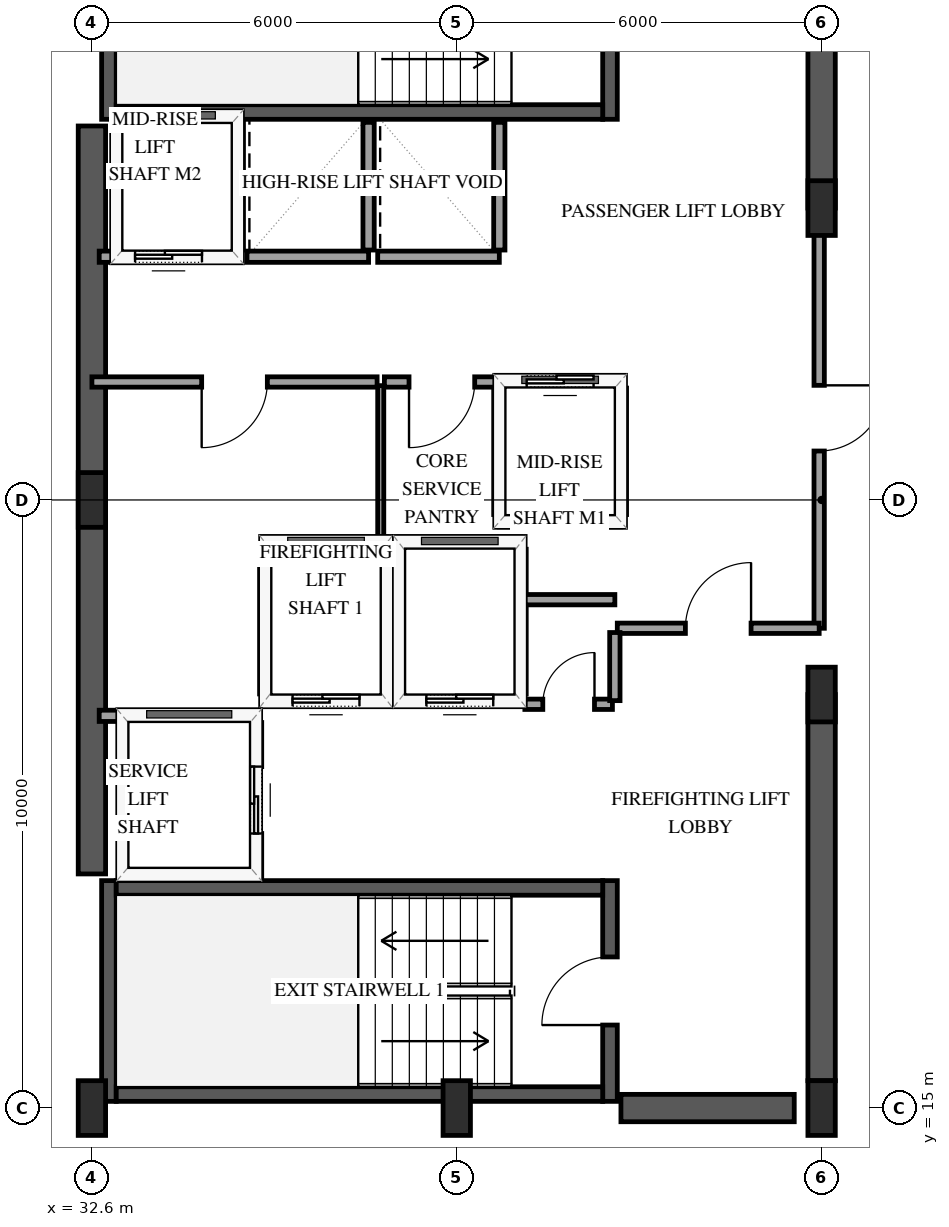
"""IFC4 building model, lengths in metres.
Left out: names, types, materials, properties, quantities, classifications, styles, units other than length and angle.
Written with IfcOpenShell. Run it as: python <this file> out.ifc"""

import sys

from ifc_helpers import new_model, si_unit, direction, frame, frame_2d, origin, origin_2d, place, context, subcontext, project, spatial, rectangle, extrude, element, fill, save


model = new_model("IFC4")
c1 = context("Model", 3, precision=1e-05, world=origin(), true_north=direction((0.0, 1.0)))
c2 = subcontext(c1, "Body", "Model", "MODEL_VIEW")
j1 = project(units=[si_unit("LENGTHUNIT", "METRE"), si_unit("PLANEANGLEUNIT", "RADIAN")], contexts=[c1])
p1 = place(None, origin())
s1 = spatial("IfcSite", under=j1, at=p1, CompositionType="ELEMENT")
p2 = place(p1, origin())
s2 = spatial("IfcBuilding", under=s1, at=p2, CompositionType="ELEMENT")
p3 = place(p2, frame((0.0, 0.0, 190.6)))
s3 = spatial("IfcBuildingStorey", under=s2, at=p3, CompositionType="ELEMENT", Elevation=190.6)
p4 = place(p3, frame((32.88, 15.11, 0.0), z_axis=(0.0, 0.0, 1.0), x_axis=(0.0, 1.0, 0.0)))
e1 = element("IfcWall", 1, at=p4, inside=s3, PredefinedType="SHEAR", context=c2, shape_type="SweptSolid", body=[
    extrude(rectangle(XDim=3.63, YDim=0.24, at=frame_2d((1.815, 0.0))), origin(), (0.0, 0.0, 1.0), 3.6),
])
p5 = place(p3, frame((41.12, 15.11, 0.0), z_axis=(0.0, 0.0, 1.0), x_axis=(0.0, 1.0, 0.0)))
e2 = element("IfcWall", 2, at=p5, inside=s3, PredefinedType="SHEAR", context=c2, shape_type="SweptSolid", body=[
    extrude(rectangle(XDim=3.63, YDim=0.24, at=frame_2d((1.815, 0.0))), origin(), (0.0, 0.0, 1.0), 3.6),
])
p6 = place(p5, frame((1.255, 0.0, 0.0)))
e3 = element("IfcOpeningElement", 3, at=p6, cuts=e2, PredefinedType="OPENING", context=c2, shape_type="SweptSolid", body=[
    extrude(rectangle(XDim=1.12, YDim=2.15, at=frame_2d((0.56, 1.075))), frame((0.0, 0.13, 0.0), z_axis=(0.0, -1.0, 0.0), x_axis=(1.0, 0.0, 0.0)), (0.0, 0.0, 1.0), 0.26),
])
for number, where, z_axis, x_axis in (
    (4, (33.0, 15.23, 0.0), (0.0, 0.0, 1.0), (1.0, 0.0, 0.0)),
    (5, (33.0, 18.62, 0.0), (0.0, 0.0, 1.0), (1.0, 0.0, 0.0)),
):
    element("IfcWall", number, at=place(p3, frame(where, z_axis=z_axis, x_axis=x_axis)), inside=s3, PredefinedType="SHEAR", context=c2, shape_type="SweptSolid", body=[
        extrude(rectangle(XDim=8.0, YDim=0.24, at=frame_2d((4.0, 0.0))), origin(), (0.0, 0.0, 1.0), 3.6),
    ])
p7 = place(p3, frame((32.88, 31.26, 0.0), z_axis=(0.0, 0.0, 1.0), x_axis=(0.0, 1.0, 0.0)))
e6 = element("IfcWall", 6, at=p7, inside=s3, PredefinedType="SHEAR", context=c2, shape_type="SweptSolid", body=[
    extrude(rectangle(XDim=3.63, YDim=0.24, at=frame_2d((1.815, 0.0))), origin(), (0.0, 0.0, 1.0), 3.6),
])
p8 = place(p3, frame((41.12, 31.26, 0.0), z_axis=(0.0, 0.0, 1.0), x_axis=(0.0, 1.0, 0.0)))
e7 = element("IfcWall", 7, at=p8, inside=s3, PredefinedType="SHEAR", context=c2, shape_type="SweptSolid", body=[
    extrude(rectangle(XDim=3.63, YDim=0.24, at=frame_2d((1.815, 0.0))), origin(), (0.0, 0.0, 1.0), 3.6),
])
p9 = place(p8, frame((1.255, 0.0, 0.0)))
e8 = element("IfcOpeningElement", 8, at=p9, cuts=e7, PredefinedType="OPENING", context=c2, shape_type="SweptSolid", body=[
    extrude(rectangle(XDim=1.12, YDim=2.15, at=frame_2d((0.56, 1.075))), frame((0.0, 0.13, 0.0), z_axis=(0.0, -1.0, 0.0), x_axis=(1.0, 0.0, 0.0)), (0.0, 0.0, 1.0), 0.26),
])
p10 = place(p3, frame((33.0, 31.38, 0.0), z_axis=(0.0, 0.0, 1.0), x_axis=(1.0, 0.0, 0.0)))
e9 = element("IfcWall", 9, at=p10, inside=s3, PredefinedType="SHEAR", context=c2, shape_type="SweptSolid", body=[
    extrude(rectangle(XDim=8.0, YDim=0.24, at=frame_2d((4.0, 0.0))), origin(), (0.0, 0.0, 1.0), 3.6),
])
p11 = place(p3, frame((32.6, 18.85, 0.0), z_axis=(0.0, 0.0, 1.0), x_axis=(0.0, 1.0, 0.0)))
e10 = element("IfcWall", 10, at=p11, inside=s3, PredefinedType="SHEAR", context=c2, shape_type="SweptSolid", body=[
    extrude(rectangle(XDim=12.3, YDim=0.45, at=frame_2d((6.15, 0.0))), origin(), (0.0, 0.0, 1.0), 3.6),
])
p12 = place(p3, frame((41.3, 15.0, 0.0), z_axis=(0.0, 0.0, 1.0), x_axis=(1.0, 0.0, 0.0)))
e11 = element("IfcWall", 11, at=p12, inside=s3, PredefinedType="SHEAR", context=c2, shape_type="SweptSolid", body=[
    extrude(rectangle(XDim=2.85, YDim=0.45, at=frame_2d((1.425, 0.0))), origin(), (0.0, 0.0, 1.0), 3.6),
])
p13 = place(p3, frame((44.6, 15.45, 0.0), z_axis=(0.0, 0.0, 1.0), x_axis=(0.0, 1.0, 0.0)))
e12 = element("IfcWall", 12, at=p13, inside=s3, PredefinedType="SHEAR", context=c2, shape_type="SweptSolid", body=[
    extrude(rectangle(XDim=6.35, YDim=0.45, at=frame_2d((3.175, 0.0))), origin(), (0.0, 0.0, 1.0), 3.6),
])
p14 = place(p3, frame((44.6, 29.8, 0.0), z_axis=(0.0, 0.0, 1.0), x_axis=(0.0, 1.0, 0.0)))
e13 = element("IfcWall", 13, at=p14, inside=s3, PredefinedType="SHEAR", context=c2, shape_type="SweptSolid", body=[
    extrude(rectangle(XDim=4.75, YDim=0.45, at=frame_2d((2.375, 0.0))), origin(), (0.0, 0.0, 1.0), 3.6),
])
for number, where, z_axis, x_axis in (
    (14, (32.6, 15.0, -0.3), (0.0, 0.0, 1.0), (1.0, 0.0, 0.0)),
    (15, (32.6, 25.0, -0.3), (0.0, 0.0, 1.0), (1.0, 0.0, 0.0)),
    (16, (38.6, 15.0, -0.3), (0.0, 0.0, 1.0), (1.0, 0.0, 0.0)),
    (17, (44.6, 15.0, -0.3), (0.0, 0.0, 1.0), (1.0, 0.0, 0.0)),
    (18, (44.6, 21.8, -0.3), (0.0, 0.0, 1.0), (1.0, 0.0, 0.0)),
    (19, (44.6, 29.8, -0.3), (0.0, 0.0, 1.0), (1.0, 0.0, 0.0)),
):
    element("IfcColumn", number, at=place(p3, frame(where, z_axis=z_axis, x_axis=x_axis)), inside=s3, PredefinedType="PILASTER", context=c2, shape_type="SweptSolid", body=[
        extrude(rectangle(XDim=0.45, YDim=0.9, at=origin_2d()), origin(), (0.0, 0.0, 1.0), 3.9),
    ])
p15 = place(p3, frame((35.45, 21.7, 0.0), z_axis=(0.0, 0.0, 1.0), x_axis=(1.0, 0.0, 0.0)))
e20 = element("IfcWall", 20, at=p15, inside=s3, PredefinedType="SOLIDWALL", context=c2, shape_type="SweptSolid", body=[
    extrude(rectangle(XDim=2.0, YDim=0.185, at=frame_2d((1.0, 0.0))), origin(), (0.0, 0.0, 1.0), 3.3),
])
p16 = place(p15, frame((0.45, 0.0, 0.0)))
e21 = element("IfcOpeningElement", 21, at=p16, cuts=e20, PredefinedType="OPENING", context=c2, shape_type="SweptSolid", body=[
    extrude(rectangle(XDim=1.1, YDim=2.15, at=frame_2d((0.55, 1.075))), frame((0.0, 0.103, 0.0), z_axis=(0.0, -1.0, 0.0), x_axis=(1.0, 0.0, 0.0)), (0.0, 0.0, 1.0), 0.205),
])
p17 = place(p3, frame((35.45, 24.3, 0.0), z_axis=(0.0, 0.0, 1.0), x_axis=(1.0, 0.0, 0.0)))
e22 = element("IfcWall", 22, at=p17, inside=s3, PredefinedType="SOLIDWALL", context=c2, shape_type="SweptSolid", body=[
    extrude(rectangle(XDim=2.0, YDim=0.185, at=frame_2d((1.0, 0.0))), origin(), (0.0, 0.0, 1.0), 3.3),
])
for number, where, z_axis, x_axis in (
    (23, (35.45, 21.81, 0.0), (0.0, 0.0, 1.0), (0.0, 1.0, 0.0)),
    (24, (37.45, 21.81, 0.0), (0.0, 0.0, 1.0), (0.0, 1.0, 0.0)),
):
    element("IfcWall", number, at=place(p3, frame(where, z_axis=z_axis, x_axis=x_axis)), inside=s3, PredefinedType="SOLIDWALL", context=c2, shape_type="SweptSolid", body=[
        extrude(rectangle(XDim=2.38, YDim=0.185, at=frame_2d((1.19, 0.0))), origin(), (0.0, 0.0, 1.0), 3.3),
    ])
p18 = place(p3, frame((37.65, 21.7, 0.0), z_axis=(0.0, 0.0, 1.0), x_axis=(1.0, 0.0, 0.0)))
e25 = element("IfcWall", 25, at=p18, inside=s3, PredefinedType="SOLIDWALL", context=c2, shape_type="SweptSolid", body=[
    extrude(rectangle(XDim=2.0, YDim=0.185, at=frame_2d((1.0, 0.0))), origin(), (0.0, 0.0, 1.0), 3.3),
])
p19 = place(p18, frame((0.45, 0.0, 0.0)))
e26 = element("IfcOpeningElement", 26, at=p19, cuts=e25, PredefinedType="OPENING", context=c2, shape_type="SweptSolid", body=[
    extrude(rectangle(XDim=1.1, YDim=2.15, at=frame_2d((0.55, 1.075))), frame((0.0, 0.103, 0.0), z_axis=(0.0, -1.0, 0.0), x_axis=(1.0, 0.0, 0.0)), (0.0, 0.0, 1.0), 0.205),
])
p20 = place(p3, frame((37.65, 24.3, 0.0), z_axis=(0.0, 0.0, 1.0), x_axis=(1.0, 0.0, 0.0)))
e27 = element("IfcWall", 27, at=p20, inside=s3, PredefinedType="SOLIDWALL", context=c2, shape_type="SweptSolid", body=[
    extrude(rectangle(XDim=2.0, YDim=0.185, at=frame_2d((1.0, 0.0))), origin(), (0.0, 0.0, 1.0), 3.3),
])
p21 = place(p3, frame((39.65, 21.81, 0.0), z_axis=(0.0, 0.0, 1.0), x_axis=(0.0, 1.0, 0.0)))
e28 = element("IfcWall", 28, at=p21, inside=s3, PredefinedType="SOLIDWALL", context=c2, shape_type="SweptSolid", body=[
    extrude(rectangle(XDim=2.38, YDim=0.185, at=frame_2d((1.19, 0.0))), origin(), (0.0, 0.0, 1.0), 3.3),
])
p22 = place(p3, frame((32.72, 21.45, 0.0), z_axis=(0.0, 0.0, 1.0), x_axis=(1.0, 0.0, 0.0)))
e29 = element("IfcWall", 29, at=p22, inside=s3, PredefinedType="SOLIDWALL", context=c2, shape_type="SweptSolid", body=[
    extrude(rectangle(XDim=2.58, YDim=0.185, at=frame_2d((1.29, 0.0))), origin(), (0.0, 0.0, 1.0), 3.3),
])
p23 = place(p3, frame((35.3, 18.79, 0.0), z_axis=(0.0, 0.0, 1.0), x_axis=(0.0, 1.0, 0.0)))
e30 = element("IfcWall", 30, at=p23, inside=s3, PredefinedType="SOLIDWALL", context=c2, shape_type="SweptSolid", body=[
    extrude(rectangle(XDim=2.55, YDim=0.185, at=frame_2d((1.275, 0.0))), origin(), (0.0, 0.0, 1.0), 3.3),
])
p24 = place(p23, frame((0.725, 0.0, 0.0)))
e31 = element("IfcOpeningElement", 31, at=p24, cuts=e30, PredefinedType="OPENING", context=c2, shape_type="SweptSolid", body=[
    extrude(rectangle(XDim=1.1, YDim=2.15, at=frame_2d((0.55, 1.075))), frame((0.0, 0.103, 0.0), z_axis=(0.0, -1.0, 0.0), x_axis=(1.0, 0.0, 0.0)), (0.0, 0.0, 1.0), 0.205),
])
p25 = place(p3, frame((39.3, 24.65, 0.0), z_axis=(0.0, 0.0, 1.0), x_axis=(1.0, 0.0, 0.0)))
e32 = element("IfcWall", 32, at=p25, inside=s3, PredefinedType="SOLIDWALL", context=c2, shape_type="SweptSolid", body=[
    extrude(rectangle(XDim=2.0, YDim=0.185, at=frame_2d((1.0, 0.0))), origin(), (0.0, 0.0, 1.0), 3.3),
])
p26 = place(p3, frame((39.3, 26.95, 0.0), z_axis=(0.0, 0.0, 1.0), x_axis=(1.0, 0.0, 0.0)))
e33 = element("IfcWall", 33, at=p26, inside=s3, PredefinedType="SOLIDWALL", context=c2, shape_type="SweptSolid", body=[
    extrude(rectangle(XDim=2.0, YDim=0.185, at=frame_2d((1.0, 0.0))), origin(), (0.0, 0.0, 1.0), 3.3),
])
p27 = place(p26, frame((0.45, 0.0, 0.0)))
e34 = element("IfcOpeningElement", 34, at=p27, cuts=e33, PredefinedType="OPENING", context=c2, shape_type="SweptSolid", body=[
    extrude(rectangle(XDim=1.1, YDim=2.15, at=frame_2d((0.55, 1.075))), frame((0.0, 0.103, 0.0), z_axis=(0.0, -1.0, 0.0), x_axis=(1.0, 0.0, 0.0)), (0.0, 0.0, 1.0), 0.205),
])
for number, where, z_axis, x_axis in (
    (35, (39.3, 24.76, 0.0), (0.0, 0.0, 1.0), (0.0, 1.0, 0.0)),
    (36, (41.3, 24.76, 0.0), (0.0, 0.0, 1.0), (0.0, 1.0, 0.0)),
):
    element("IfcWall", number, at=place(p3, frame(where, z_axis=z_axis, x_axis=x_axis)), inside=s3, PredefinedType="SOLIDWALL", context=c2, shape_type="SweptSolid", body=[
        extrude(rectangle(XDim=2.08, YDim=0.185, at=frame_2d((1.04, 0.0))), origin(), (0.0, 0.0, 1.0), 3.3),
    ])
p28 = place(p3, frame((32.72, 29.0, 0.0), z_axis=(0.0, 0.0, 1.0), x_axis=(1.0, 0.0, 0.0)))
e37 = element("IfcWall", 37, at=p28, inside=s3, PredefinedType="SOLIDWALL", context=c2, shape_type="SweptSolid", body=[
    extrude(rectangle(XDim=2.28, YDim=0.185, at=frame_2d((1.14, 0.0))), origin(), (0.0, 0.0, 1.0), 3.3),
])
p29 = place(p28, frame((0.59, 0.0, 0.0)))
e38 = element("IfcOpeningElement", 38, at=p29, cuts=e37, PredefinedType="OPENING", context=c2, shape_type="SweptSolid", body=[
    extrude(rectangle(XDim=1.1, YDim=2.15, at=frame_2d((0.55, 1.075))), frame((0.0, 0.103, 0.0), z_axis=(0.0, -1.0, 0.0), x_axis=(1.0, 0.0, 0.0)), (0.0, 0.0, 1.0), 0.205),
])
p30 = place(p3, frame((35.0, 29.11, 0.0), z_axis=(0.0, 0.0, 1.0), x_axis=(0.0, 1.0, 0.0)))
e39 = element("IfcWall", 39, at=p30, inside=s3, PredefinedType="SOLIDWALL", context=c2, shape_type="SweptSolid", body=[
    extrude(rectangle(XDim=2.1, YDim=0.185, at=frame_2d((1.05, 0.0))), origin(), (0.0, 0.0, 1.0), 3.3),
])
p31 = place(p3, frame((35.15, 29.0, 0.0), z_axis=(0.0, 0.0, 1.0), x_axis=(1.0, 0.0, 0.0)))
e40 = element("IfcWall", 40, at=p31, inside=s3, PredefinedType="SOLIDWALL", context=c2, shape_type="SweptSolid", body=[
    extrude(rectangle(XDim=2.0, YDim=0.185, at=frame_2d((1.0, 0.0))), origin(), (0.0, 0.0, 1.0), 3.3),
])
p32 = place(p3, frame((37.15, 29.11, 0.0), z_axis=(0.0, 0.0, 1.0), x_axis=(0.0, 1.0, 0.0)))
e41 = element("IfcWall", 41, at=p32, inside=s3, PredefinedType="SOLIDWALL", context=c2, shape_type="SweptSolid", body=[
    extrude(rectangle(XDim=2.1, YDim=0.185, at=frame_2d((1.05, 0.0))), origin(), (0.0, 0.0, 1.0), 3.3),
])
p33 = place(p3, frame((37.3, 29.0, 0.0), z_axis=(0.0, 0.0, 1.0), x_axis=(1.0, 0.0, 0.0)))
e42 = element("IfcWall", 42, at=p33, inside=s3, PredefinedType="SOLIDWALL", context=c2, shape_type="SweptSolid", body=[
    extrude(rectangle(XDim=2.0, YDim=0.185, at=frame_2d((1.0, 0.0))), origin(), (0.0, 0.0, 1.0), 3.3),
])
p34 = place(p3, frame((39.3, 29.11, 0.0), z_axis=(0.0, 0.0, 1.0), x_axis=(0.0, 1.0, 0.0)))
e43 = element("IfcWall", 43, at=p34, inside=s3, PredefinedType="SOLIDWALL", context=c2, shape_type="SweptSolid", body=[
    extrude(rectangle(XDim=2.1, YDim=0.185, at=frame_2d((1.05, 0.0))), origin(), (0.0, 0.0, 1.0), 3.3),
])
p35 = place(p3, frame((44.56, 29.8, 0.0), z_axis=(0.0, 0.0, 1.0), x_axis=(0.0, -1.0, 0.0)))
e44 = element("IfcWall", 44, at=p35, inside=s3, PredefinedType="PARTITIONING", context=c2, shape_type="SweptSolid", body=[
    extrude(rectangle(XDim=6.91, YDim=0.17, at=frame_2d((3.455, 0.0))), origin(), (0.0, 0.0, 1.0), 2.34),
])
p36 = place(p35, frame((2.915, 0.0, 0.0)))
e45 = element("IfcOpeningElement", 45, at=p36, cuts=e44, PredefinedType="OPENING", context=c2, shape_type="SweptSolid", body=[
    extrude(rectangle(XDim=1.08, YDim=2.15, at=frame_2d((0.54, 1.075))), frame((0.0, 0.095, 0.0), z_axis=(0.0, -1.0, 0.0), x_axis=(1.0, 0.0, 0.0)), (0.0, 0.0, 1.0), 0.19),
])
p37 = place(p3, frame((37.29, 26.94, 0.0), z_axis=(0.0, 0.0, 1.0), x_axis=(-1.0, 0.0, 0.0)))
e46 = element("IfcWall", 46, at=p37, inside=s3, PredefinedType="PARTITIONING", context=c2, shape_type="SweptSolid", body=[
    extrude(rectangle(XDim=4.69, YDim=0.17, at=frame_2d((2.345, 0.0))), origin(), (0.0, 0.0, 1.0), 3.3),
])
p38 = place(p37, frame((1.805, 0.0, 0.0)))
e47 = element("IfcOpeningElement", 47, at=p38, cuts=e46, PredefinedType="OPENING", context=c2, shape_type="SweptSolid", body=[
    extrude(rectangle(XDim=1.08, YDim=2.15, at=frame_2d((0.54, 1.075))), frame((0.0, 0.095, 0.0), z_axis=(0.0, -1.0, 0.0), x_axis=(1.0, 0.0, 0.0)), (0.0, 0.0, 1.0), 0.19),
])
p39 = place(p3, frame((41.24, 22.89, 0.0), z_axis=(0.0, 0.0, 1.0), x_axis=(1.0, 0.0, 0.0)))
e48 = element("IfcWall", 48, at=p39, inside=s3, PredefinedType="PARTITIONING", context=c2, shape_type="SweptSolid", body=[
    extrude(rectangle(XDim=3.32, YDim=0.17, at=frame_2d((1.66, 0.0))), origin(), (0.0, 0.0, 1.0), 3.3),
])
p40 = place(p39, frame((1.12, 0.0, 0.0)))
e49 = element("IfcOpeningElement", 49, at=p40, cuts=e48, PredefinedType="OPENING", context=c2, shape_type="SweptSolid", body=[
    extrude(rectangle(XDim=1.08, YDim=2.15, at=frame_2d((0.54, 1.075))), frame((0.0, 0.095, 0.0), z_axis=(0.0, -1.0, 0.0), x_axis=(1.0, 0.0, 0.0)), (0.0, 0.0, 1.0), 0.19),
])
p41 = place(p3, frame((37.35, 26.88, 0.0), z_axis=(0.0, 0.0, 1.0), x_axis=(0.0, -1.0, 0.0)))
e50 = element("IfcWall", 50, at=p41, inside=s3, PredefinedType="PARTITIONING", context=c2, shape_type="SweptSolid", body=[
    extrude(rectangle(XDim=2.58, YDim=0.1, at=frame_2d((1.29, 0.0))), origin(), (0.0, 0.0, 1.0), 3.3),
])
p42 = place(p3, frame((39.3, 26.94, 0.0), z_axis=(0.0, 0.0, 1.0), x_axis=(-1.0, 0.0, 0.0)))
e51 = element("IfcWall", 51, at=p42, inside=s3, PredefinedType="PARTITIONING", context=c2, shape_type="SweptSolid", body=[
    extrude(rectangle(XDim=1.89, YDim=0.17, at=frame_2d((0.945, 0.0))), origin(), (0.0, 0.0, 1.0), 3.3),
])
p43 = place(p42, frame((0.405, 0.0, 0.0)))
e52 = element("IfcOpeningElement", 52, at=p43, cuts=e51, PredefinedType="OPENING", context=c2, shape_type="SweptSolid", body=[
    extrude(rectangle(XDim=1.08, YDim=2.15, at=frame_2d((0.54, 1.075))), frame((0.0, 0.095, 0.0), z_axis=(0.0, -1.0, 0.0), x_axis=(1.0, 0.0, 0.0)), (0.0, 0.0, 1.0), 0.19),
])
p44 = place(p3, frame((39.72, 21.64, 0.0), z_axis=(0.0, 0.0, 1.0), x_axis=(1.0, 0.0, 0.0)))
e53 = element("IfcWall", 53, at=p44, inside=s3, PredefinedType="PARTITIONING", context=c2, shape_type="SweptSolid", body=[
    extrude(rectangle(XDim=1.44, YDim=0.17, at=frame_2d((0.72, 0.0))), origin(), (0.0, 0.0, 1.0), 3.3),
])
p45 = place(p44, frame((0.295, 0.0, 0.0)))
e54 = element("IfcOpeningElement", 54, at=p45, cuts=e53, PredefinedType="OPENING", context=c2, shape_type="SweptSolid", body=[
    extrude(rectangle(XDim=0.85, YDim=2.1, at=frame_2d((0.425, 1.05))), frame((0.0, 0.095, 0.0), z_axis=(0.0, -1.0, 0.0), x_axis=(1.0, 0.0, 0.0)), (0.0, 0.0, 1.0), 0.19),
])
p46 = place(p3, frame((41.2, 21.7, 0.0), z_axis=(0.0, 0.0, 1.0), x_axis=(0.0, 1.0, 0.0)))
e55 = element("IfcWall", 55, at=p46, inside=s3, PredefinedType="PARTITIONING", context=c2, shape_type="SweptSolid", body=[
    extrude(rectangle(XDim=1.12, YDim=0.17, at=frame_2d((0.56, 0.0))), origin(), (0.0, 0.0, 1.0), 3.3),
])
p47 = place(p3, frame((41.2, 23.36, 0.0), z_axis=(0.0, 0.0, 1.0), x_axis=(-1.0, 0.0, 0.0)))
e56 = element("IfcWall", 56, at=p47, inside=s3, PredefinedType="PARTITIONING", context=c2, shape_type="SweptSolid", body=[
    extrude(rectangle(XDim=1.48, YDim=0.17, at=frame_2d((0.74, 0.0))), origin(), (0.0, 0.0, 1.0), 3.3),
])
p48 = place(p16, origin())
e57 = element("IfcDoor", 57, at=p48, inside=s3, OperationType="SLIDING_TO_LEFT", PredefinedType="DOOR", context=c2, shape_type="SweptSolid", body=[
    extrude(rectangle(XDim=1.1, YDim=2.15, at=frame_2d((0.55, 1.075))), frame((0.0, 0.025, 0.0), z_axis=(0.0, -1.0, 0.0), x_axis=(1.0, 0.0, 0.0)), (0.0, 0.0, 1.0), 0.05),
])
fill(e21, e57)
p49 = place(p19, origin())
e58 = element("IfcDoor", 58, at=p49, inside=s3, OperationType="SLIDING_TO_LEFT", PredefinedType="DOOR", context=c2, shape_type="SweptSolid", body=[
    extrude(rectangle(XDim=1.1, YDim=2.15, at=frame_2d((0.55, 1.075))), frame((0.0, 0.025, 0.0), z_axis=(0.0, -1.0, 0.0), x_axis=(1.0, 0.0, 0.0)), (0.0, 0.0, 1.0), 0.05),
])
fill(e26, e58)
p50 = place(p24, origin())
e59 = element("IfcDoor", 59, at=p50, inside=s3, OperationType="SLIDING_TO_LEFT", PredefinedType="DOOR", context=c2, shape_type="SweptSolid", body=[
    extrude(rectangle(XDim=1.1, YDim=2.15, at=frame_2d((0.55, 1.075))), frame((0.0, 0.025, 0.0), z_axis=(0.0, -1.0, 0.0), x_axis=(1.0, 0.0, 0.0)), (0.0, 0.0, 1.0), 0.05),
])
fill(e31, e59)
p51 = place(p27, origin())
e60 = element("IfcDoor", 60, at=p51, inside=s3, OperationType="SLIDING_TO_LEFT", PredefinedType="DOOR", context=c2, shape_type="SweptSolid", body=[
    extrude(rectangle(XDim=1.1, YDim=2.15, at=frame_2d((0.55, 1.075))), frame((0.0, 0.025, 0.0), z_axis=(0.0, -1.0, 0.0), x_axis=(1.0, 0.0, 0.0)), (0.0, 0.0, 1.0), 0.05),
])
fill(e34, e60)
p52 = place(p29, origin())
e61 = element("IfcDoor", 61, at=p52, inside=s3, OperationType="SLIDING_TO_LEFT", PredefinedType="DOOR", context=c2, shape_type="SweptSolid", body=[
    extrude(rectangle(XDim=1.1, YDim=2.15, at=frame_2d((0.55, 1.075))), frame((0.0, 0.025, 0.0), z_axis=(0.0, -1.0, 0.0), x_axis=(1.0, 0.0, 0.0)), (0.0, 0.0, 1.0), 0.05),
])
fill(e38, e61)
p53 = place(p6, origin())
e62 = element("IfcDoor", 62, at=p53, inside=s3, OperationType="SINGLE_SWING_LEFT", PredefinedType="DOOR", context=c2, shape_type="SweptSolid", body=[
    extrude(rectangle(XDim=1.12, YDim=2.15, at=frame_2d((0.56, 1.075))), frame((0.0, 0.025, 0.0), z_axis=(0.0, -1.0, 0.0), x_axis=(1.0, 0.0, 0.0)), (0.0, 0.0, 1.0), 0.05),
])
fill(e3, e62)
p54 = place(p36, origin())
e63 = element("IfcDoor", 63, at=p54, inside=s3, OperationType="SINGLE_SWING_LEFT", PredefinedType="DOOR", context=c2, shape_type="SweptSolid", body=[
    extrude(rectangle(XDim=1.08, YDim=2.15, at=frame_2d((0.54, 1.075))), frame((0.0, 0.025, 0.0), z_axis=(0.0, -1.0, 0.0), x_axis=(1.0, 0.0, 0.0)), (0.0, 0.0, 1.0), 0.05),
])
fill(e45, e63)
p55 = place(p38, origin())
e64 = element("IfcDoor", 64, at=p55, inside=s3, OperationType="SINGLE_SWING_RIGHT", PredefinedType="DOOR", context=c2, shape_type="SweptSolid", body=[
    extrude(rectangle(XDim=1.08, YDim=2.15, at=frame_2d((0.54, 1.075))), frame((0.0, 0.025, 0.0), z_axis=(0.0, -1.0, 0.0), x_axis=(1.0, 0.0, 0.0)), (0.0, 0.0, 1.0), 0.05),
])
fill(e47, e64)
p56 = place(p40, origin())
e65 = element("IfcDoor", 65, at=p56, inside=s3, OperationType="SINGLE_SWING_RIGHT", PredefinedType="DOOR", context=c2, shape_type="SweptSolid", body=[
    extrude(rectangle(XDim=1.08, YDim=2.15, at=frame_2d((0.54, 1.075))), frame((0.0, 0.025, 0.0), z_axis=(0.0, -1.0, 0.0), x_axis=(1.0, 0.0, 0.0)), (0.0, 0.0, 1.0), 0.05),
])
fill(e49, e65)
p57 = place(p43, origin())
e66 = element("IfcDoor", 66, at=p57, inside=s3, OperationType="SINGLE_SWING_RIGHT", PredefinedType="DOOR", context=c2, shape_type="SweptSolid", body=[
    extrude(rectangle(XDim=1.08, YDim=2.15, at=frame_2d((0.54, 1.075))), frame((0.0, 0.025, 0.0), z_axis=(0.0, -1.0, 0.0), x_axis=(1.0, 0.0, 0.0)), (0.0, 0.0, 1.0), 0.05),
])
fill(e52, e66)
p58 = place(p45, origin())
e67 = element("IfcDoor", 67, at=p58, inside=s3, OperationType="SINGLE_SWING_RIGHT", PredefinedType="DOOR", context=c2, shape_type="SweptSolid", body=[
    extrude(rectangle(XDim=0.85, YDim=2.1, at=frame_2d((0.425, 1.05))), frame((0.0, 0.025, 0.0), z_axis=(0.0, -1.0, 0.0), x_axis=(1.0, 0.0, 0.0)), (0.0, 0.0, 1.0), 0.05),
])
fill(e54, e67)
save(model, sys.argv[1])
